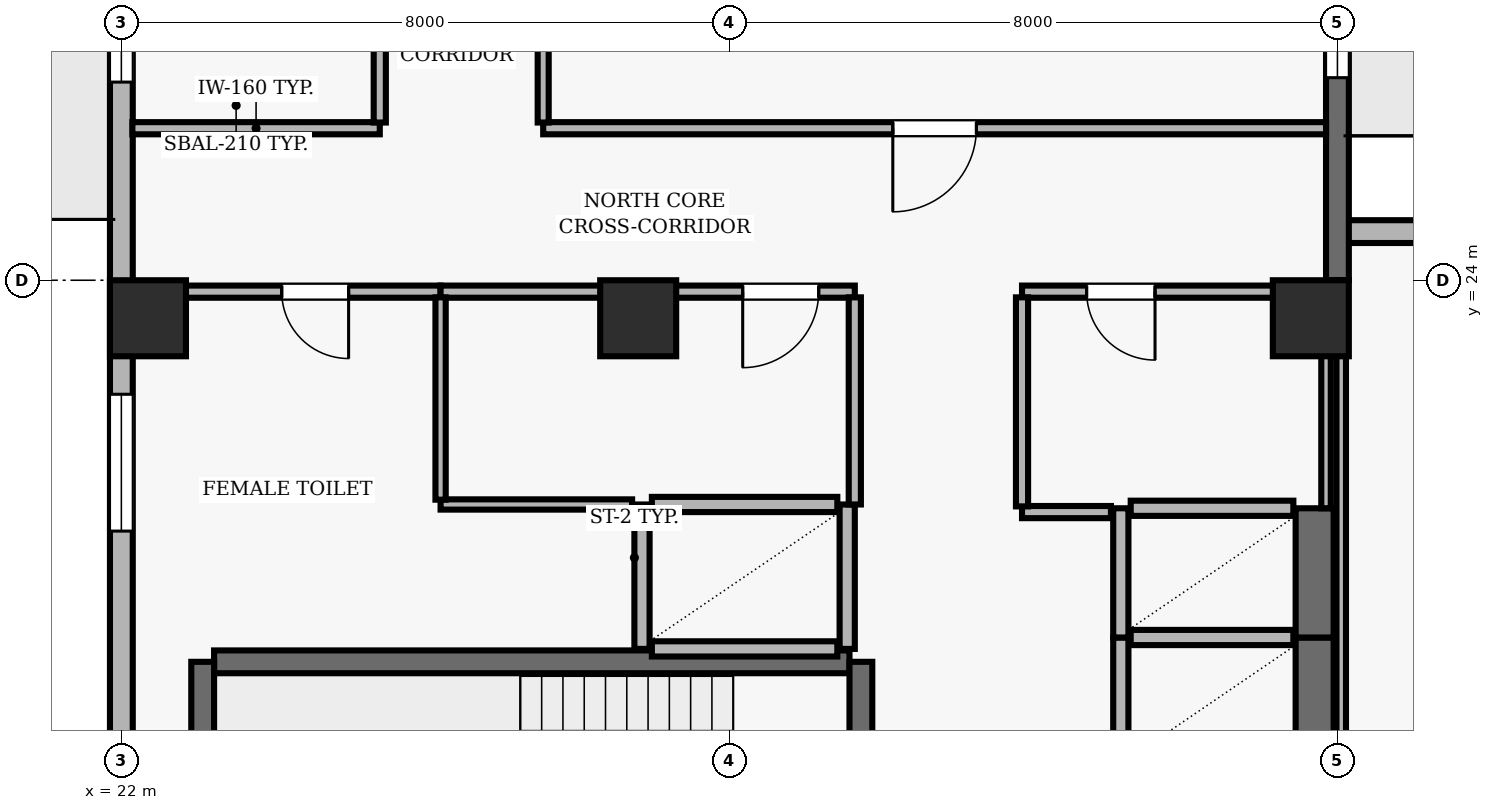
"""IFC4 building model, lengths in metres.
Left out: names, types, materials, properties, quantities, classifications, styles, units other than length and angle.
Written with IfcOpenShell. Run it as: python <this file> out.ifc"""

import sys

from ifc_helpers import new_model, si_unit, direction, frame, frame_2d, origin, origin_2d, place, context, subcontext, project, spatial, rectangle, extrude, element, fill, save


model = new_model("IFC4")
c1 = context("Model", 3, precision=1e-05, world=origin(), true_north=direction((0.0, 1.0)))
c2 = subcontext(c1, "Body", "Model", "MODEL_VIEW")
j1 = project(units=[si_unit("LENGTHUNIT", "METRE"), si_unit("PLANEANGLEUNIT", "RADIAN")], contexts=[c1])
p1 = place(None, origin())
s1 = spatial("IfcSite", under=j1, at=p1, CompositionType="ELEMENT")
p2 = place(p1, origin())
s2 = spatial("IfcBuilding", under=s1, at=p2, CompositionType="ELEMENT")
p3 = place(p2, frame((0.0, 0.0, 175.8)))
s3 = spatial("IfcBuildingStorey", under=s2, at=p3, CompositionType="ELEMENT", Elevation=175.8)
for number, where, z_axis, x_axis in (
    (1, (22.35, 23.5, 0.0), (0.0, 0.0, 1.0), (1.0, 0.0, 0.0)),
    (2, (28.8, 23.5, 0.0), (0.0, 0.0, 1.0), (1.0, 0.0, 0.0)),
    (3, (37.65, 23.5, 0.0), (0.0, 0.0, 1.0), (1.0, 0.0, 0.0)),
):
    element("IfcColumn", number, at=place(p3, frame(where, z_axis=z_axis, x_axis=x_axis)), inside=s3, PredefinedType="COLUMN", context=c2, shape_type="SweptSolid", body=[
        extrude(rectangle(XDim=1.0, YDim=1.0, at=origin_2d()), origin(), (0.0, 0.0, 1.0), 3.9),
    ])
p4 = place(p3, frame((48.8, 24.64, 0.0), z_axis=(0.0, 0.0, 1.0), x_axis=(-1.0, 0.0, 0.0)))
e4 = element("IfcWall", 4, at=p4, inside=s3, PredefinedType="SOLIDWALL", context=c2, shape_type="SweptSolid", body=[
    extrude(rectangle(XDim=10.8, YDim=0.3, at=frame_2d((5.4, 0.0))), origin(), (0.0, 0.0, 1.0), 3.69),
])
p5 = place(p4, frame((4.65, 0.0, 0.9)))
e5 = element("IfcOpeningElement", 5, at=p5, cuts=e4, PredefinedType="OPENING", context=c2, shape_type="SweptSolid", body=[
    extrude(rectangle(XDim=1.5, YDim=1.6, at=frame_2d((0.75, 0.8))), frame((0.0, 0.16, 0.0), z_axis=(0.0, -1.0, 0.0), x_axis=(1.0, 0.0, 0.0)), (0.0, 0.0, 1.0), 0.32),
])
p6 = place(p3, frame((38.0, 24.0, 0.0), z_axis=(0.0, 0.0, 1.0), x_axis=(0.0, 1.0, 0.0)))
e6 = element("IfcWall", 6, at=p6, inside=s3, PredefinedType="SOLIDWALL", context=c2, shape_type="SweptSolid", body=[
    extrude(rectangle(XDim=16.7, YDim=0.3, at=frame_2d((8.35, 0.0))), origin(), (0.0, 0.0, 1.0), 3.69),
])
p7 = place(p6, frame((7.81, 0.0, 0.0)))
e7 = element("IfcOpeningElement", 7, at=p7, cuts=e6, PredefinedType="OPENING", context=c2, shape_type="SweptSolid", body=[
    extrude(rectangle(XDim=1.0, YDim=2.2, at=frame_2d((0.5, 1.1))), frame((0.0, 0.16, 0.0), z_axis=(0.0, -1.0, 0.0), x_axis=(1.0, 0.0, 0.0)), (0.0, 0.0, 1.0), 0.32),
])
p8 = place(p6, frame((2.665, 0.0, 0.9)))
e8 = element("IfcOpeningElement", 8, at=p8, cuts=e6, PredefinedType="OPENING", context=c2, shape_type="SweptSolid", body=[
    extrude(rectangle(XDim=1.8, YDim=1.6, at=frame_2d((0.9, 0.8))), frame((0.0, 0.16, 0.0), z_axis=(0.0, -1.0, 0.0), x_axis=(1.0, 0.0, 0.0)), (0.0, 0.0, 1.0), 0.32),
])
p9 = place(p3, frame((22.0, 40.7, 0.0), z_axis=(0.0, 0.0, 1.0), x_axis=(0.0, -1.0, 0.0)))
e9 = element("IfcWall", 9, at=p9, inside=s3, PredefinedType="SOLIDWALL", context=c2, shape_type="SweptSolid", body=[
    extrude(rectangle(XDim=38.2, YDim=0.3, at=frame_2d((19.1, 0.0))), origin(), (0.0, 0.0, 1.0), 3.69),
])
p10 = place(p9, frame((6.7, 0.0, 0.0)))
e10 = element("IfcOpeningElement", 10, at=p10, cuts=e9, PredefinedType="OPENING", context=c2, shape_type="SweptSolid", body=[
    extrude(rectangle(XDim=1.0, YDim=2.2, at=frame_2d((0.5, 1.1))), frame((0.0, 0.16, 0.0), z_axis=(0.0, -1.0, 0.0), x_axis=(1.0, 0.0, 0.0)), (0.0, 0.0, 1.0), 0.32),
])
p11 = place(p9, frame((12.293, 0.0, 0.9)))
e11 = element("IfcOpeningElement", 11, at=p11, cuts=e9, PredefinedType="OPENING", context=c2, shape_type="SweptSolid", body=[
    extrude(rectangle(XDim=1.8, YDim=1.8, at=frame_2d((0.9, 0.9))), frame((0.0, 0.16, 0.0), z_axis=(0.0, -1.0, 0.0), x_axis=(1.0, 0.0, 0.0)), (0.0, 0.0, 1.0), 0.32),
])
p12 = place(p9, frame((18.2, 0.0, 0.9)))
e12 = element("IfcOpeningElement", 12, at=p12, cuts=e9, PredefinedType="OPENING", context=c2, shape_type="SweptSolid", body=[
    extrude(rectangle(XDim=1.8, YDim=1.8, at=frame_2d((0.9, 0.9))), frame((0.0, 0.16, 0.0), z_axis=(0.0, -1.0, 0.0), x_axis=(1.0, 0.0, 0.0)), (0.0, 0.0, 1.0), 0.32),
])
p13 = place(p9, frame((23.207, 0.0, 0.9)))
e13 = element("IfcOpeningElement", 13, at=p13, cuts=e9, PredefinedType="OPENING", context=c2, shape_type="SweptSolid", body=[
    extrude(rectangle(XDim=1.8, YDim=1.8, at=frame_2d((0.9, 0.9))), frame((0.0, 0.16, 0.0), z_axis=(0.0, -1.0, 0.0), x_axis=(1.0, 0.0, 0.0)), (0.0, 0.0, 1.0), 0.32),
])
p14 = place(p9, frame((29.114, 0.0, 0.9)))
e14 = element("IfcOpeningElement", 14, at=p14, cuts=e9, PredefinedType="OPENING", context=c2, shape_type="SweptSolid", body=[
    extrude(rectangle(XDim=1.8, YDim=1.8, at=frame_2d((0.9, 0.9))), frame((0.0, 0.16, 0.0), z_axis=(0.0, -1.0, 0.0), x_axis=(1.0, 0.0, 0.0)), (0.0, 0.0, 1.0), 0.32),
])
p15 = place(p3, frame((31.58, 18.98, 0.0), z_axis=(0.0, 0.0, 1.0), x_axis=(-1.0, 0.0, 0.0)))
e15 = element("IfcWall", 15, at=p15, inside=s3, PredefinedType="SHEAR", context=c2, shape_type="SweptSolid", body=[
    extrude(rectangle(XDim=8.36, YDim=0.3, at=frame_2d((4.18, 0.0))), origin(), (0.0, 0.0, 1.0), 3.69),
])
p16 = place(p3, frame((23.07, 18.98, 0.0), z_axis=(0.0, 0.0, 1.0), x_axis=(0.0, -1.0, 0.0)))
e16 = element("IfcWall", 16, at=p16, inside=s3, PredefinedType="SHEAR", context=c2, shape_type="SweptSolid", body=[
    extrude(rectangle(XDim=3.51, YDim=0.3, at=frame_2d((1.755, 0.0))), origin(), (0.0, 0.0, 1.0), 3.69),
])
p17 = place(p3, frame((31.73, 15.47, 0.0), z_axis=(0.0, 0.0, 1.0), x_axis=(0.0, 1.0, 0.0)))
e17 = element("IfcWall", 17, at=p17, inside=s3, PredefinedType="SHEAR", context=c2, shape_type="SweptSolid", body=[
    extrude(rectangle(XDim=3.51, YDim=0.3, at=frame_2d((1.755, 0.0))), origin(), (0.0, 0.0, 1.0), 3.69),
])
p18 = place(p17, frame((1.18, 0.0, 0.0)))
e18 = element("IfcOpeningElement", 18, at=p18, cuts=e17, PredefinedType="OPENING", context=c2, shape_type="SweptSolid", body=[
    extrude(rectangle(XDim=1.15, YDim=2.15, at=frame_2d((0.575, 1.075))), frame((0.0, 0.16, 0.0), z_axis=(0.0, -1.0, 0.0), x_axis=(1.0, 0.0, 0.0)), (0.0, 0.0, 1.0), 0.32),
])
p19 = place(p3, frame((35.15, 19.3, 0.0), z_axis=(0.0, 0.0, 1.0), x_axis=(0.0, -1.0, 0.0)))
e19 = element("IfcWall", 19, at=p19, inside=s3, PredefinedType="SOLIDWALL", context=c2, shape_type="SweptSolid", body=[
    extrude(rectangle(XDim=1.7, YDim=0.2, at=frame_2d((0.85, 0.0))), origin(), (0.0, 0.0, 1.0), 3.69),
])
p20 = place(p3, frame((37.7, 17.6, 0.0), z_axis=(0.0, 0.0, 1.0), x_axis=(0.0, 1.0, 0.0)))
e20 = element("IfcWall", 20, at=p20, inside=s3, PredefinedType="SHEAR", context=c2, shape_type="SweptSolid", body=[
    extrude(rectangle(XDim=1.7, YDim=0.5, at=frame_2d((0.85, 0.0))), origin(), (0.0, 0.0, 1.0), 3.69),
])
p21 = place(p3, frame((37.42, 19.3, 0.0), z_axis=(0.0, 0.0, 1.0), x_axis=(-1.0, 0.0, 0.0)))
e21 = element("IfcWall", 21, at=p21, inside=s3, PredefinedType="SOLIDWALL", context=c2, shape_type="SweptSolid", body=[
    extrude(rectangle(XDim=2.14, YDim=0.2, at=frame_2d((1.07, 0.0))), origin(), (0.0, 0.0, 1.0), 3.69),
])
p22 = place(p3, frame((35.15, 21.0, 0.0), z_axis=(0.0, 0.0, 1.0), x_axis=(0.0, -1.0, 0.0)))
e22 = element("IfcWall", 22, at=p22, inside=s3, PredefinedType="SOLIDWALL", context=c2, shape_type="SweptSolid", body=[
    extrude(rectangle(XDim=1.7, YDim=0.2, at=frame_2d((0.85, 0.0))), origin(), (0.0, 0.0, 1.0), 3.69),
])
p23 = place(p3, frame((37.7, 19.3, 0.0), z_axis=(0.0, 0.0, 1.0), x_axis=(0.0, 1.0, 0.0)))
e23 = element("IfcWall", 23, at=p23, inside=s3, PredefinedType="SHEAR", context=c2, shape_type="SweptSolid", body=[
    extrude(rectangle(XDim=1.7, YDim=0.5, at=frame_2d((0.85, 0.0))), origin(), (0.0, 0.0, 1.0), 3.69),
])
p24 = place(p3, frame((37.42, 21.0, 0.0), z_axis=(0.0, 0.0, 1.0), x_axis=(-1.0, 0.0, 0.0)))
e24 = element("IfcWall", 24, at=p24, inside=s3, PredefinedType="SOLIDWALL", context=c2, shape_type="SweptSolid", body=[
    extrude(rectangle(XDim=2.14, YDim=0.2, at=frame_2d((1.07, 0.0))), origin(), (0.0, 0.0, 1.0), 3.69),
])
for number, where, z_axis, x_axis in (
    (25, (28.85, 21.05, 0.0), (0.0, 0.0, 1.0), (0.0, -1.0, 0.0)),
    (26, (31.55, 19.15, 0.0), (0.0, 0.0, 1.0), (0.0, 1.0, 0.0)),
):
    element("IfcWall", number, at=place(p3, frame(where, z_axis=z_axis, x_axis=x_axis)), inside=s3, PredefinedType="SOLIDWALL", context=c2, shape_type="SweptSolid", body=[
        extrude(rectangle(XDim=1.9, YDim=0.2, at=frame_2d((0.95, 0.0))), origin(), (0.0, 0.0, 1.0), 3.69),
    ])
for number, where, z_axis, x_axis in (
    (27, (28.98, 19.15, 0.0), (0.0, 0.0, 1.0), (1.0, 0.0, 0.0)),
    (28, (31.42, 21.05, 0.0), (0.0, 0.0, 1.0), (-1.0, 0.0, 0.0)),
):
    element("IfcWall", number, at=place(p3, frame(where, z_axis=z_axis, x_axis=x_axis)), inside=s3, PredefinedType="SOLIDWALL", context=c2, shape_type="SweptSolid", body=[
        extrude(rectangle(XDim=2.44, YDim=0.2, at=frame_2d((1.22, 0.0))), origin(), (0.0, 0.0, 1.0), 3.69),
    ])
p25 = place(p3, frame((25.4, 26.0, 0.0), z_axis=(0.0, 0.0, 1.0), x_axis=(-1.0, 0.0, 0.0)))
e29 = element("IfcWall", 29, at=p25, inside=s3, PredefinedType="PARTITIONING", context=c2, shape_type="SweptSolid", body=[
    extrude(rectangle(XDim=3.255, YDim=0.16, at=frame_2d((1.627, 0.0))), origin(), (0.0, 0.0, 1.0), 3.69),
])
p26 = place(p3, frame((26.2, 21.05, 0.0), z_axis=(0.0, 0.0, 1.0), x_axis=(1.0, 0.0, 0.0)))
e30 = element("IfcWall", 30, at=p26, inside=s3, PredefinedType="PARTITIONING", context=c2, shape_type="SweptSolid", body=[
    extrude(rectangle(XDim=2.52, YDim=0.135, at=frame_2d((1.26, 0.0))), origin(), (0.0, 0.0, 1.0), 3.69),
])
p27 = place(p3, frame((26.2, 23.85, 0.0), z_axis=(0.0, 0.0, 1.0), x_axis=(-1.0, 0.0, 0.0)))
e31 = element("IfcWall", 31, at=p27, inside=s3, PredefinedType="PARTITIONING", context=c2, shape_type="SweptSolid", body=[
    extrude(rectangle(XDim=4.0, YDim=0.16, at=frame_2d((2.0, 0.0))), origin(), (0.0, 0.0, 1.0), 3.139),
])
p28 = place(p27, frame((1.21, 0.0, 0.0)))
e32 = element("IfcOpeningElement", 32, at=p28, cuts=e31, PredefinedType="OPENING", context=c2, shape_type="SweptSolid", body=[
    extrude(rectangle(XDim=0.88, YDim=2.1, at=frame_2d((0.44, 1.05))), frame((0.0, 0.09, 0.0), z_axis=(0.0, -1.0, 0.0), x_axis=(1.0, 0.0, 0.0)), (0.0, 0.0, 1.0), 0.18),
])
p29 = place(p3, frame((31.65, 23.85, 0.0), z_axis=(0.0, 0.0, 1.0), x_axis=(-1.0, 0.0, 0.0)))
e33 = element("IfcWall", 33, at=p29, inside=s3, PredefinedType="PARTITIONING", context=c2, shape_type="SweptSolid", body=[
    extrude(rectangle(XDim=5.45, YDim=0.16, at=frame_2d((2.725, 0.0))), origin(), (0.0, 0.0, 1.0), 3.139),
])
p30 = place(p29, frame((0.475, 0.0, 0.0)))
e34 = element("IfcOpeningElement", 34, at=p30, cuts=e33, PredefinedType="OPENING", context=c2, shape_type="SweptSolid", body=[
    extrude(rectangle(XDim=1.0, YDim=2.1, at=frame_2d((0.5, 1.05))), frame((0.0, 0.09, 0.0), z_axis=(0.0, -1.0, 0.0), x_axis=(1.0, 0.0, 0.0)), (0.0, 0.0, 1.0), 0.18),
])
p31 = place(p3, frame((35.02, 20.95, 0.0), z_axis=(0.0, 0.0, 1.0), x_axis=(-1.0, 0.0, 0.0)))
e35 = element("IfcWall", 35, at=p31, inside=s3, PredefinedType="PARTITIONING", context=c2, shape_type="SweptSolid", body=[
    extrude(rectangle(XDim=1.17, YDim=0.16, at=frame_2d((0.585, 0.0))), origin(), (0.0, 0.0, 1.0), 3.69),
])
p32 = place(p3, frame((37.85, 23.85, 0.0), z_axis=(0.0, 0.0, 1.0), x_axis=(-1.0, 0.0, 0.0)))
e36 = element("IfcWall", 36, at=p32, inside=s3, PredefinedType="PARTITIONING", context=c2, shape_type="SweptSolid", body=[
    extrude(rectangle(XDim=4.0, YDim=0.16, at=frame_2d((2.0, 0.0))), origin(), (0.0, 0.0, 1.0), 3.139),
])
p33 = place(p32, frame((2.25, 0.0, 0.0)))
e37 = element("IfcOpeningElement", 37, at=p33, cuts=e36, PredefinedType="OPENING", context=c2, shape_type="SweptSolid", body=[
    extrude(rectangle(XDim=0.9, YDim=2.1, at=frame_2d((0.45, 1.05))), frame((0.0, 0.09, 0.0), z_axis=(0.0, -1.0, 0.0), x_axis=(1.0, 0.0, 0.0)), (0.0, 0.0, 1.0), 0.18),
])
p34 = place(p3, frame((37.85, 26.0, 0.0), z_axis=(0.0, 0.0, 1.0), x_axis=(-1.0, 0.0, 0.0)))
e38 = element("IfcWall", 38, at=p34, inside=s3, PredefinedType="PARTITIONING", context=c2, shape_type="SweptSolid", body=[
    extrude(rectangle(XDim=10.3, YDim=0.16, at=frame_2d((5.15, 0.0))), origin(), (0.0, 0.0, 1.0), 3.69),
])
p35 = place(p34, frame((4.6, 0.0, 0.0)))
e39 = element("IfcOpeningElement", 39, at=p35, cuts=e38, PredefinedType="OPENING", context=c2, shape_type="SweptSolid", body=[
    extrude(rectangle(XDim=1.1, YDim=2.15, at=frame_2d((0.55, 1.075))), frame((0.0, 0.09, 0.0), z_axis=(0.0, -1.0, 0.0), x_axis=(1.0, 0.0, 0.0)), (0.0, 0.0, 1.0), 0.18),
])
p36 = place(p3, frame((25.4, 31.765, 0.0), z_axis=(0.0, 0.0, 1.0), x_axis=(0.0, -1.0, 0.0)))
e40 = element("IfcWall", 40, at=p36, inside=s3, PredefinedType="PARTITIONING", context=c2, shape_type="SweptSolid", body=[
    extrude(rectangle(XDim=5.69, YDim=0.16, at=frame_2d((2.845, 0.0))), origin(), (0.0, 0.0, 1.0), 3.69),
])
p37 = place(p36, frame((2.345, 0.0, 0.0)))
e41 = element("IfcOpeningElement", 41, at=p37, cuts=e40, PredefinedType="OPENING", context=c2, shape_type="SweptSolid", body=[
    extrude(rectangle(XDim=1.0, YDim=2.1, at=frame_2d((0.5, 1.05))), frame((0.0, 0.09, 0.0), z_axis=(0.0, -1.0, 0.0), x_axis=(1.0, 0.0, 0.0)), (0.0, 0.0, 1.0), 0.18),
])
p38 = place(p3, frame((26.2, 23.775, 0.0), z_axis=(0.0, 0.0, 1.0), x_axis=(0.0, -1.0, 0.0)))
e42 = element("IfcWall", 42, at=p38, inside=s3, PredefinedType="PARTITIONING", context=c2, shape_type="SweptSolid", body=[
    extrude(rectangle(XDim=2.662, YDim=0.135, at=frame_2d((1.331, 0.0))), origin(), (0.0, 0.0, 1.0), 3.69),
])
p39 = place(p3, frame((27.55, 26.075, 0.0), z_axis=(0.0, 0.0, 1.0), x_axis=(0.0, 1.0, 0.0)))
e43 = element("IfcWall", 43, at=p39, inside=s3, PredefinedType="PARTITIONING", context=c2, shape_type="SweptSolid", body=[
    extrude(rectangle(XDim=5.708, YDim=0.145, at=frame_2d((2.854, 0.0))), origin(), (0.0, 0.0, 1.0), 3.69),
])
p40 = place(p3, frame((31.65, 23.775, 0.0), z_axis=(0.0, 0.0, 1.0), x_axis=(0.0, -1.0, 0.0)))
e44 = element("IfcWall", 44, at=p40, inside=s3, PredefinedType="PARTITIONING", context=c2, shape_type="SweptSolid", body=[
    extrude(rectangle(XDim=2.725, YDim=0.16, at=frame_2d((1.362, 0.0))), origin(), (0.0, 0.0, 1.0), 3.69),
])
p41 = place(p3, frame((33.85, 21.025, 0.0), z_axis=(0.0, 0.0, 1.0), x_axis=(0.0, 1.0, 0.0)))
e45 = element("IfcWall", 45, at=p41, inside=s3, PredefinedType="PARTITIONING", context=c2, shape_type="SweptSolid", body=[
    extrude(rectangle(XDim=2.75, YDim=0.16, at=frame_2d((1.375, 0.0))), origin(), (0.0, 0.0, 1.0), 3.69),
])
p42 = place(p3, frame((37.85, 21.0, 0.0), z_axis=(0.0, 0.0, 1.0), x_axis=(0.0, 1.0, 0.0)))
e46 = element("IfcWall", 46, at=p42, inside=s3, PredefinedType="PARTITIONING", context=c2, shape_type="SweptSolid", body=[
    extrude(rectangle(XDim=2.775, YDim=0.125, at=frame_2d((1.387, 0.0))), origin(), (0.0, 0.0, 1.0), 3.139),
])
p43 = place(p3, frame((38.05, 24.0, 0.0), z_axis=(0.0, 0.0, 1.0), x_axis=(0.0, -1.0, 0.0)))
e47 = element("IfcWall", 47, at=p43, inside=s3, PredefinedType="PARTITIONING", context=c2, shape_type="SweptSolid", body=[
    extrude(rectangle(XDim=7.925, YDim=0.125, at=frame_2d((3.962, 0.0))), origin(), (0.0, 0.0, 1.0), 3.139),
])
p44 = place(p8, origin())
e48 = element("IfcWindow", 48, at=p44, inside=s3, PartitioningType="SINGLE_PANEL", PredefinedType="WINDOW", context=c2, shape_type="SweptSolid", body=[
    extrude(rectangle(XDim=1.8, YDim=1.6, at=frame_2d((0.9, 0.8))), frame((0.0, 0.03, 0.0), z_axis=(0.0, -1.0, 0.0), x_axis=(1.0, 0.0, 0.0)), (0.0, 0.0, 1.0), 0.06),
])
fill(e8, e48)
p45 = place(p11, origin())
e49 = element("IfcWindow", 49, at=p45, inside=s3, PartitioningType="SINGLE_PANEL", PredefinedType="WINDOW", context=c2, shape_type="SweptSolid", body=[
    extrude(rectangle(XDim=1.8, YDim=1.8, at=frame_2d((0.9, 0.9))), frame((0.0, 0.03, 0.0), z_axis=(0.0, -1.0, 0.0), x_axis=(1.0, 0.0, 0.0)), (0.0, 0.0, 1.0), 0.06),
])
fill(e11, e49)
p46 = place(p12, origin())
e50 = element("IfcWindow", 50, at=p46, inside=s3, PartitioningType="SINGLE_PANEL", PredefinedType="WINDOW", context=c2, shape_type="SweptSolid", body=[
    extrude(rectangle(XDim=1.8, YDim=1.8, at=frame_2d((0.9, 0.9))), frame((0.0, 0.03, 0.0), z_axis=(0.0, -1.0, 0.0), x_axis=(1.0, 0.0, 0.0)), (0.0, 0.0, 1.0), 0.06),
])
fill(e12, e50)
p47 = place(p33, origin())
e51 = element("IfcDoor", 51, at=p47, inside=s3, OperationType="SINGLE_SWING_LEFT", PredefinedType="DOOR", context=c2, shape_type="SweptSolid", body=[
    extrude(rectangle(XDim=0.9, YDim=2.1, at=frame_2d((0.45, 1.05))), frame((0.0, 0.025, 0.0), z_axis=(0.0, -1.0, 0.0), x_axis=(1.0, 0.0, 0.0)), (0.0, 0.0, 1.0), 0.05),
])
fill(e37, e51)
p48 = place(p30, origin())
e52 = element("IfcDoor", 52, at=p48, inside=s3, OperationType="SINGLE_SWING_RIGHT", PredefinedType="DOOR", context=c2, shape_type="SweptSolid", body=[
    extrude(rectangle(XDim=1.0, YDim=2.1, at=frame_2d((0.5, 1.05))), frame((0.0, 0.025, 0.0), z_axis=(0.0, -1.0, 0.0), x_axis=(1.0, 0.0, 0.0)), (0.0, 0.0, 1.0), 0.05),
])
fill(e34, e52)
p49 = place(p28, origin())
e53 = element("IfcDoor", 53, at=p49, inside=s3, OperationType="SINGLE_SWING_LEFT", PredefinedType="DOOR", context=c2, shape_type="SweptSolid", body=[
    extrude(rectangle(XDim=0.88, YDim=2.1, at=frame_2d((0.44, 1.05))), frame((0.0, 0.025, 0.0), z_axis=(0.0, -1.0, 0.0), x_axis=(1.0, 0.0, 0.0)), (0.0, 0.0, 1.0), 0.05),
])
fill(e32, e53)
p50 = place(p35, origin())
e54 = element("IfcDoor", 54, at=p50, inside=s3, OperationType="SINGLE_SWING_RIGHT", PredefinedType="DOOR", context=c2, shape_type="SweptSolid", body=[
    extrude(rectangle(XDim=1.1, YDim=2.15, at=frame_2d((0.55, 1.075))), frame((0.0, 0.025, 0.0), z_axis=(0.0, -1.0, 0.0), x_axis=(1.0, 0.0, 0.0)), (0.0, 0.0, 1.0), 0.05),
])
fill(e39, e54)
save(model, sys.argv[1])
